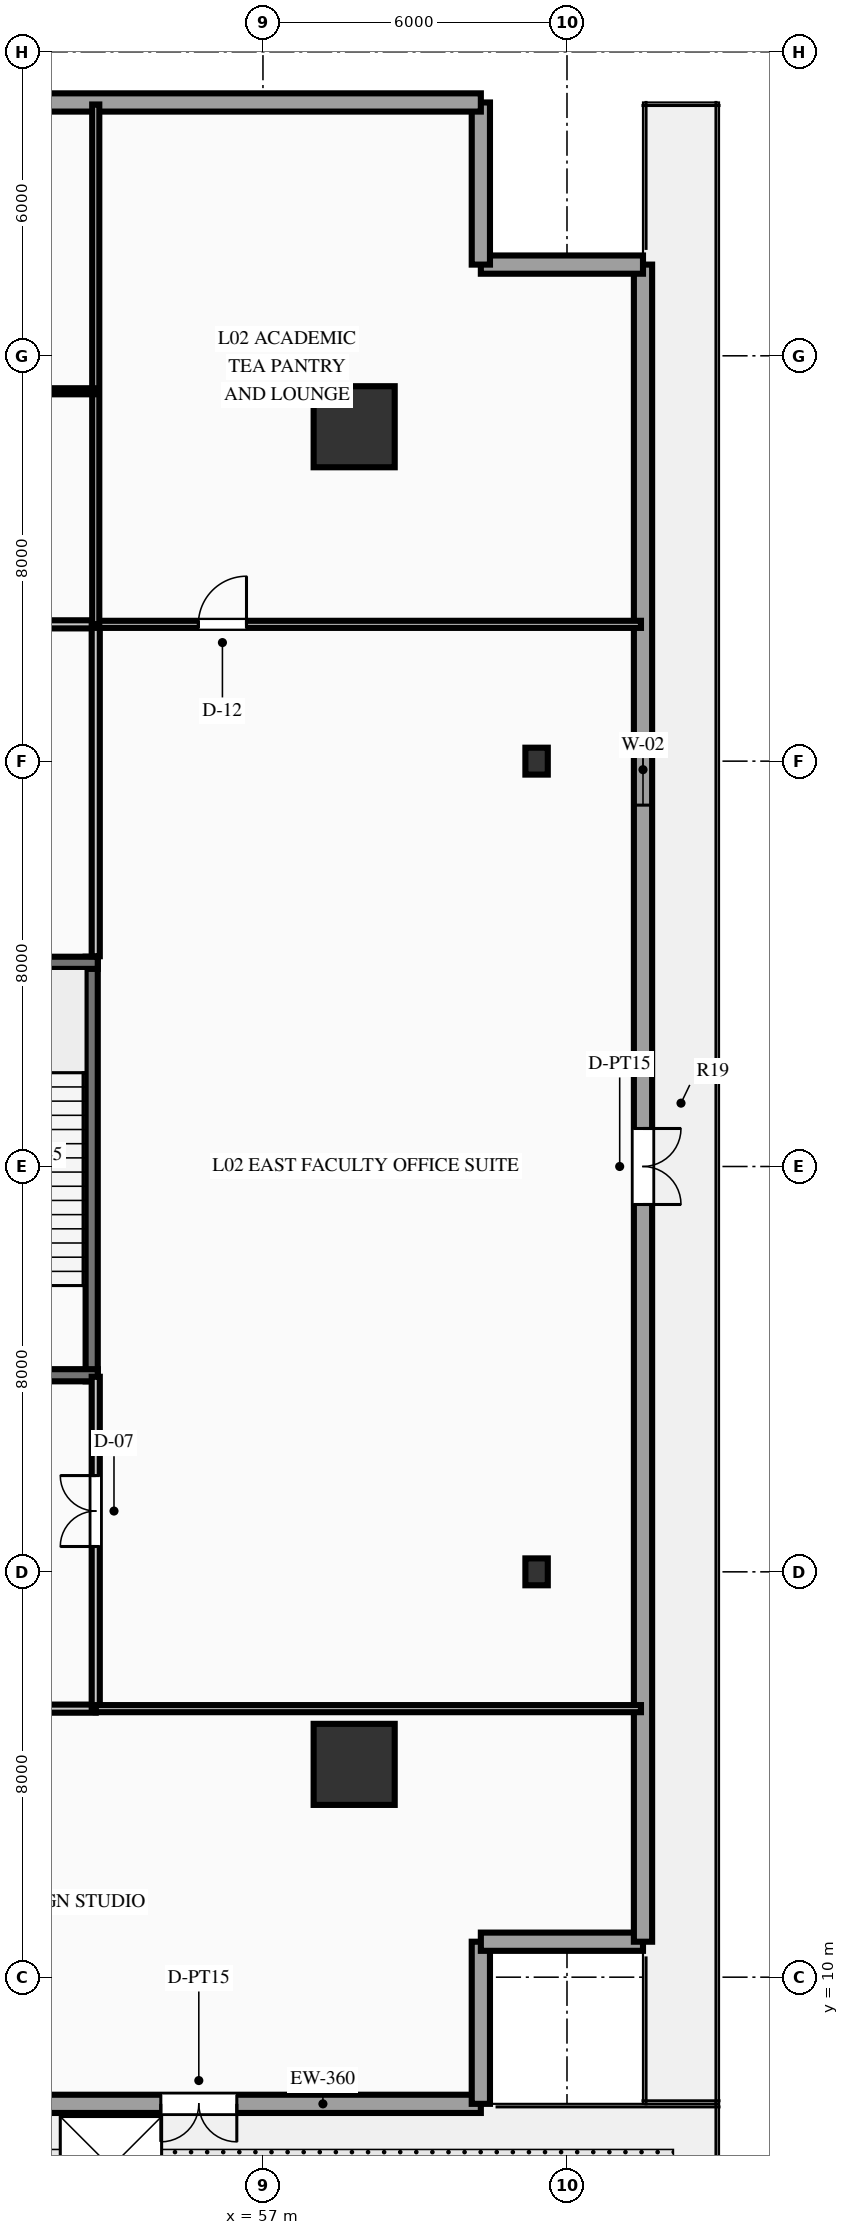
"""IFC4 building model, lengths in metres.
Left out: names, types, materials, properties, quantities, classifications, styles, units other than length and angle.
Written with IfcOpenShell. Run it as: python <this file> out.ifc"""

import sys

from ifc_helpers import new_model, si_unit, direction, frame, frame_2d, origin, origin_2d, place, context, subcontext, project, spatial, rectangle, hollow_rectangle, i_section, extrude, element, fill, save


model = new_model("IFC4")
c1 = context("Model", 3, precision=1e-05, world=origin(), true_north=direction((0.0, 1.0)))
c2 = subcontext(c1, "Body", "Model", "MODEL_VIEW")
j1 = project(units=[si_unit("LENGTHUNIT", "METRE"), si_unit("PLANEANGLEUNIT", "RADIAN")], contexts=[c1])
p1 = place(None, origin())
s1 = spatial("IfcSite", under=j1, at=p1, CompositionType="ELEMENT")
p2 = place(p1, origin())
s2 = spatial("IfcBuilding", under=s1, at=p2, CompositionType="ELEMENT")
p3 = place(p2, frame((0.0, 0.0, 11.4)))
s3 = spatial("IfcBuildingStorey", under=s2, at=p3, CompositionType="ELEMENT", Elevation=11.4)
p4 = place(p3, frame((53.62, 21.76, 0.0), z_axis=(0.0, 0.0, 1.0), x_axis=(0.0, 1.0, 0.0)))
e1 = element("IfcWall", 1, at=p4, inside=s3, PredefinedType="SHEAR", context=c2, shape_type="SweptSolid", body=[
    extrude(rectangle(XDim=8.38, YDim=0.24, at=frame_2d((4.19, 0.0))), origin(), (0.0, 0.0, 1.0), 5.4),
])
p5 = place(p3, frame((49.76, 21.88, 0.0), z_axis=(0.0, 0.0, 1.0), x_axis=(1.0, 0.0, 0.0)))
e2 = element("IfcWall", 2, at=p5, inside=s3, PredefinedType="SHEAR", context=c2, shape_type="SweptSolid", body=[
    extrude(rectangle(XDim=3.98, YDim=0.24, at=frame_2d((1.99, 0.0))), origin(), (0.0, 0.0, 1.0), 5.4),
])
p6 = place(p5, frame((1.465, 0.0, 0.0)))
e3 = element("IfcOpeningElement", 3, at=p6, cuts=e2, PredefinedType="OPENING", context=c2, shape_type="SweptSolid", body=[
    extrude(rectangle(XDim=1.05, YDim=2.15, at=frame_2d((0.525, 1.075))), frame((0.0, 0.13, 0.0), z_axis=(0.0, -1.0, 0.0), x_axis=(1.0, 0.0, 0.0)), (0.0, 0.0, 1.0), 0.26),
])
p7 = place(p3, frame((49.76, 30.02, 0.0), z_axis=(0.0, 0.0, 1.0), x_axis=(1.0, 0.0, 0.0)))
e4 = element("IfcWall", 4, at=p7, inside=s3, PredefinedType="SHEAR", context=c2, shape_type="SweptSolid", body=[
    extrude(rectangle(XDim=3.98, YDim=0.24, at=frame_2d((1.99, 0.0))), origin(), (0.0, 0.0, 1.0), 5.4),
])
for number, where, z_axis, x_axis in (
    (5, (58.8, 14.2, 0.0), (0.0, 0.0, 1.0), (1.0, 0.0, 0.0)),
    (6, (58.8, 40.6, 0.0), (0.0, 0.0, 1.0), (1.0, 0.0, 0.0)),
):
    element("IfcColumn", number, at=place(p3, frame(where, z_axis=z_axis, x_axis=x_axis)), inside=s3, PredefinedType="COLUMN", context=c2, shape_type="SweptSolid", body=[
        extrude(hollow_rectangle(XDim=1.6, YDim=1.6, WallThickness=0.08, at=origin_2d()), origin(), (0.0, 0.0, 1.0), 5.4),
    ])
for number, where, z_axis, x_axis in (
    (7, (62.4, 18.0, 0.0), (0.0, 0.0, 1.0), (1.0, 0.0, 0.0)),
    (8, (62.4, 34.0, 0.0), (0.0, 0.0, 1.0), (1.0, 0.0, 0.0)),
):
    element("IfcColumn", number, at=place(p3, frame(where, z_axis=z_axis, x_axis=x_axis)), inside=s3, PredefinedType="COLUMN", context=c2, shape_type="SweptSolid", body=[
        extrude(i_section(OverallWidth=0.442, OverallDepth=0.531, WebThickness=0.066, FlangeThickness=0.106, at=origin_2d()), origin(), (0.0, 0.0, 1.0), 5.4),
    ])
p8 = place(p3, frame((61.3, 7.5, 0.0), z_axis=(0.0, 0.0, 1.0), x_axis=(-1.0, 0.0, 0.0)))
e9 = element("IfcWall", 9, at=p8, inside=s3, PredefinedType="STANDARD", context=c2, shape_type="SweptSolid", body=[
    extrude(rectangle(XDim=11.132, YDim=0.36, at=frame_2d((5.566, 0.0))), origin(), (0.0, 0.0, 1.0), 5.07),
])
p9 = place(p8, frame((4.816, 0.0, 0.0)))
e10 = element("IfcOpeningElement", 10, at=p9, cuts=e9, PredefinedType="OPENING", context=c2, shape_type="SweptSolid", body=[
    extrude(rectangle(XDim=1.5, YDim=2.25, at=frame_2d((0.75, 1.125))), frame((0.0, 0.19, 0.0), z_axis=(0.0, -1.0, 0.0), x_axis=(1.0, 0.0, 0.0)), (0.0, 0.0, 1.0), 0.38),
])
for number, where, z_axis, x_axis in (
    (11, (61.3, 10.7, 0.0), (0.0, 0.0, 1.0), (0.0, -1.0, 0.0)),
    (12, (64.5, 10.7, 0.0), (0.0, 0.0, 1.0), (-1.0, 0.0, 0.0)),
):
    element("IfcWall", number, at=place(p3, frame(where, z_axis=z_axis, x_axis=x_axis)), inside=s3, PredefinedType="STANDARD", context=c2, shape_type="SweptSolid", body=[
        extrude(rectangle(XDim=3.2, YDim=0.36, at=frame_2d((1.6, 0.0))), origin(), (0.0, 0.0, 1.0), 5.07),
    ])
p10 = place(p3, frame((64.5, 43.8, 0.0), z_axis=(0.0, 0.0, 1.0), x_axis=(0.0, -1.0, 0.0)))
e13 = element("IfcWall", 13, at=p10, inside=s3, PredefinedType="STANDARD", context=c2, shape_type="SweptSolid", body=[
    extrude(rectangle(XDim=33.1, YDim=0.36, at=frame_2d((16.55, 0.0))), origin(), (0.0, 0.0, 1.0), 5.07),
])
p11 = place(p10, frame((17.05, 0.0, 0.0)))
e14 = element("IfcOpeningElement", 14, at=p11, cuts=e13, PredefinedType="OPENING", context=c2, shape_type="SweptSolid", body=[
    extrude(rectangle(XDim=1.5, YDim=2.25, at=frame_2d((0.75, 1.125))), frame((0.0, 0.19, 0.0), z_axis=(0.0, -1.0, 0.0), x_axis=(1.0, 0.0, 0.0)), (0.0, 0.0, 1.0), 0.38),
])
p12 = place(p10, frame((9.268, 0.0, 1.0)))
e15 = element("IfcOpeningElement", 15, at=p12, cuts=e13, PredefinedType="OPENING", context=c2, shape_type="SweptSolid", body=[
    extrude(rectangle(XDim=1.4, YDim=2.2, at=frame_2d((0.7, 1.1))), frame((0.0, 0.19, 0.0), z_axis=(0.0, -1.0, 0.0), x_axis=(1.0, 0.0, 0.0)), (0.0, 0.0, 1.0), 0.38),
])
for number, where, z_axis, x_axis in (
    (16, (61.3, 43.8, 0.0), (0.0, 0.0, 1.0), (1.0, 0.0, 0.0)),
    (17, (61.3, 47.0, 0.0), (0.0, 0.0, 1.0), (0.0, -1.0, 0.0)),
):
    element("IfcWall", number, at=place(p3, frame(where, z_axis=z_axis, x_axis=x_axis)), inside=s3, PredefinedType="STANDARD", context=c2, shape_type="SweptSolid", body=[
        extrude(rectangle(XDim=3.2, YDim=0.36, at=frame_2d((1.6, 0.0))), origin(), (0.0, 0.0, 1.0), 5.07),
    ])
p13 = place(p3, frame((50.168, 47.0, 0.0), z_axis=(0.0, 0.0, 1.0), x_axis=(1.0, 0.0, 0.0)))
e18 = element("IfcWall", 18, at=p13, inside=s3, PredefinedType="STANDARD", context=c2, shape_type="SweptSolid", body=[
    extrude(rectangle(XDim=11.132, YDim=0.36, at=frame_2d((5.566, 0.0))), origin(), (0.0, 0.0, 1.0), 5.07),
])
p14 = place(p3, frame((18.3, 15.3, 0.0), z_axis=(0.0, 0.0, 1.0), x_axis=(1.0, 0.0, 0.0)))
e19 = element("IfcWall", 19, at=p14, inside=s3, PredefinedType="PARTITIONING", context=c2, shape_type="SweptSolid", body=[
    extrude(rectangle(XDim=35.4, YDim=0.16, at=frame_2d((17.7, 0.0))), origin(), (0.0, 0.0, 1.0), 4.292),
])
p15 = place(p14, frame((5.825, 0.0, 0.0)))
e20 = element("IfcOpeningElement", 20, at=p15, cuts=e19, PredefinedType="OPENING", context=c2, shape_type="SweptSolid", body=[
    extrude(rectangle(XDim=1.05, YDim=2.15, at=frame_2d((0.525, 1.075))), frame((0.0, 0.09, 0.0), z_axis=(0.0, -1.0, 0.0), x_axis=(1.0, 0.0, 0.0)), (0.0, 0.0, 1.0), 0.18),
])
p16 = place(p14, frame((16.55, 0.0, 0.0)))
e21 = element("IfcOpeningElement", 21, at=p16, cuts=e19, PredefinedType="OPENING", context=c2, shape_type="SweptSolid", body=[
    extrude(rectangle(XDim=1.4, YDim=2.2, at=frame_2d((0.7, 1.1))), frame((0.0, 0.09, 0.0), z_axis=(0.0, -1.0, 0.0), x_axis=(1.0, 0.0, 0.0)), (0.0, 0.0, 1.0), 0.18),
])
p17 = place(p14, frame((28.075, 0.0, 0.0)))
e22 = element("IfcOpeningElement", 22, at=p17, cuts=e19, PredefinedType="OPENING", context=c2, shape_type="SweptSolid", body=[
    extrude(rectangle(XDim=1.05, YDim=2.15, at=frame_2d((0.525, 1.075))), frame((0.0, 0.09, 0.0), z_axis=(0.0, -1.0, 0.0), x_axis=(1.0, 0.0, 0.0)), (0.0, 0.0, 1.0), 0.18),
])
p18 = place(p3, frame((18.3, 36.7, 0.0), z_axis=(0.0, 0.0, 1.0), x_axis=(1.0, 0.0, 0.0)))
e23 = element("IfcWall", 23, at=p18, inside=s3, PredefinedType="PARTITIONING", context=c2, shape_type="SweptSolid", body=[
    extrude(rectangle(XDim=35.4, YDim=0.16, at=frame_2d((17.7, 0.0))), origin(), (0.0, 0.0, 1.0), 5.07),
])
p19 = place(p18, frame((4.725, 0.0, 0.0)))
e24 = element("IfcOpeningElement", 24, at=p19, cuts=e23, PredefinedType="OPENING", context=c2, shape_type="SweptSolid", body=[
    extrude(rectangle(XDim=1.05, YDim=2.15, at=frame_2d((0.525, 1.075))), frame((0.0, 0.09, 0.0), z_axis=(0.0, -1.0, 0.0), x_axis=(1.0, 0.0, 0.0)), (0.0, 0.0, 1.0), 0.18),
])
p20 = place(p18, frame((16.975, 0.0, 0.0)))
e25 = element("IfcOpeningElement", 25, at=p20, cuts=e23, PredefinedType="OPENING", context=c2, shape_type="SweptSolid", body=[
    extrude(rectangle(XDim=1.05, YDim=2.15, at=frame_2d((0.525, 1.075))), frame((0.0, 0.09, 0.0), z_axis=(0.0, -1.0, 0.0), x_axis=(1.0, 0.0, 0.0)), (0.0, 0.0, 1.0), 0.18),
])
p21 = place(p18, frame((27.225, 0.0, 0.0)))
e26 = element("IfcOpeningElement", 26, at=p21, cuts=e23, PredefinedType="OPENING", context=c2, shape_type="SweptSolid", body=[
    extrude(rectangle(XDim=0.95, YDim=2.15, at=frame_2d((0.475, 1.075))), frame((0.0, 0.09, 0.0), z_axis=(0.0, -1.0, 0.0), x_axis=(1.0, 0.0, 0.0)), (0.0, 0.0, 1.0), 0.18),
])
p22 = place(p18, frame((30.275, 0.0, 0.0)))
e27 = element("IfcOpeningElement", 27, at=p22, cuts=e23, PredefinedType="OPENING", context=c2, shape_type="SweptSolid", body=[
    extrude(rectangle(XDim=0.95, YDim=2.15, at=frame_2d((0.475, 1.075))), frame((0.0, 0.09, 0.0), z_axis=(0.0, -1.0, 0.0), x_axis=(1.0, 0.0, 0.0)), (0.0, 0.0, 1.0), 0.18),
])
p23 = place(p18, frame((33.3, 0.0, 0.0)))
e28 = element("IfcOpeningElement", 28, at=p23, cuts=e23, PredefinedType="OPENING", context=c2, shape_type="SweptSolid", body=[
    extrude(rectangle(XDim=1.0, YDim=2.15, at=frame_2d((0.5, 1.075))), frame((0.0, 0.09, 0.0), z_axis=(0.0, -1.0, 0.0), x_axis=(1.0, 0.0, 0.0)), (0.0, 0.0, 1.0), 0.18),
])
p24 = place(p3, frame((53.7, 15.3, 0.0), z_axis=(0.0, 0.0, 1.0), x_axis=(0.0, 1.0, 0.0)))
e29 = element("IfcWall", 29, at=p24, inside=s3, PredefinedType="PARTITIONING", context=c2, shape_type="SweptSolid", body=[
    extrude(rectangle(XDim=6.55, YDim=0.16, at=frame_2d((3.275, 0.0))), origin(), (0.0, 0.0, 1.0), 5.07),
])
p25 = place(p24, frame((3.2, 0.0, 0.0)))
e30 = element("IfcOpeningElement", 30, at=p25, cuts=e29, PredefinedType="OPENING", context=c2, shape_type="SweptSolid", body=[
    extrude(rectangle(XDim=1.4, YDim=2.2, at=frame_2d((0.7, 1.1))), frame((0.0, 0.09, 0.0), z_axis=(0.0, -1.0, 0.0), x_axis=(1.0, 0.0, 0.0)), (0.0, 0.0, 1.0), 0.18),
])
p26 = place(p3, frame((53.7, 30.15, 0.0), z_axis=(0.0, 0.0, 1.0), x_axis=(0.0, 1.0, 0.0)))
e31 = element("IfcWall", 31, at=p26, inside=s3, PredefinedType="PARTITIONING", context=c2, shape_type="SweptSolid", body=[
    extrude(rectangle(XDim=6.55, YDim=0.16, at=frame_2d((3.275, 0.0))), origin(), (0.0, 0.0, 1.0), 5.07),
])
p27 = place(p3, frame((53.7, 15.3, 0.0), z_axis=(0.0, 0.0, 1.0), x_axis=(1.0, 0.0, 0.0)))
e32 = element("IfcWall", 32, at=p27, inside=s3, PredefinedType="PARTITIONING", context=c2, shape_type="SweptSolid", body=[
    extrude(rectangle(XDim=10.76, YDim=0.14, at=frame_2d((5.38, 0.0))), origin(), (0.0, 0.0, 1.0), 4.292),
])
p28 = place(p3, frame((53.7, 36.7, 0.0), z_axis=(0.0, 0.0, 1.0), x_axis=(1.0, 0.0, 0.0)))
e33 = element("IfcWall", 33, at=p28, inside=s3, PredefinedType="PARTITIONING", context=c2, shape_type="SweptSolid", body=[
    extrude(rectangle(XDim=10.76, YDim=0.14, at=frame_2d((5.38, 0.0))), origin(), (0.0, 0.0, 1.0), 5.07),
])
p29 = place(p28, frame((2.025, 0.0, 0.0)))
e34 = element("IfcOpeningElement", 34, at=p29, cuts=e33, PredefinedType="OPENING", context=c2, shape_type="SweptSolid", body=[
    extrude(rectangle(XDim=0.95, YDim=2.15, at=frame_2d((0.475, 1.075))), frame((0.0, 0.08, 0.0), z_axis=(0.0, -1.0, 0.0), x_axis=(1.0, 0.0, 0.0)), (0.0, 0.0, 1.0), 0.16),
])
p30 = place(p3, frame((53.7, 36.7, 0.0), z_axis=(0.0, 0.0, 1.0), x_axis=(0.0, 1.0, 0.0)))
e35 = element("IfcWall", 35, at=p30, inside=s3, PredefinedType="PARTITIONING", context=c2, shape_type="SweptSolid", body=[
    extrude(rectangle(XDim=10.26, YDim=0.14, at=frame_2d((5.13, 0.0))), origin(), (0.0, 0.0, 1.0), 5.07),
])
p31 = place(p3, frame((44.5, 41.3, 0.0), z_axis=(0.0, 0.0, 1.0), x_axis=(1.0, 0.0, 0.0)))
e36 = element("IfcWall", 36, at=p31, inside=s3, PredefinedType="PARTITIONING", context=c2, shape_type="SweptSolid", body=[
    extrude(rectangle(XDim=9.2, YDim=0.12, at=frame_2d((4.6, 0.0))), origin(), (0.0, 0.0, 1.0), 4.292),
])
p32 = place(p9, origin())
e37 = element("IfcDoor", 37, at=p32, inside=s3, OperationType="DOUBLE_DOOR_SINGLE_SWING", PredefinedType="DOOR", context=c2, shape_type="SweptSolid", body=[
    extrude(rectangle(XDim=1.5, YDim=2.25, at=frame_2d((0.75, 1.125))), frame((0.0, 0.025, 0.0), z_axis=(0.0, -1.0, 0.0), x_axis=(1.0, 0.0, 0.0)), (0.0, 0.0, 1.0), 0.05),
])
fill(e10, e37)
p33 = place(p11, origin())
e38 = element("IfcDoor", 38, at=p33, inside=s3, OperationType="DOUBLE_DOOR_SINGLE_SWING", PredefinedType="DOOR", context=c2, shape_type="SweptSolid", body=[
    extrude(rectangle(XDim=1.5, YDim=2.25, at=frame_2d((0.75, 1.125))), frame((0.0, 0.025, 0.0), z_axis=(0.0, -1.0, 0.0), x_axis=(1.0, 0.0, 0.0)), (0.0, 0.0, 1.0), 0.05),
])
fill(e14, e38)
p34 = place(p12, origin())
e39 = element("IfcWindow", 39, at=p34, inside=s3, PartitioningType="SINGLE_PANEL", PredefinedType="WINDOW", context=c2, shape_type="SweptSolid", body=[
    extrude(rectangle(XDim=1.4, YDim=2.2, at=frame_2d((0.7, 1.1))), frame((0.0, 0.03, 0.0), z_axis=(0.0, -1.0, 0.0), x_axis=(1.0, 0.0, 0.0)), (0.0, 0.0, 1.0), 0.06),
])
fill(e15, e39)
p35 = place(p3, frame((0.0, 0.0, -0.25)))
p36 = place(p35, frame((54.0, 6.25, 0.2)))
e40 = element("IfcWindow", 40, at=p36, inside=s3, PartitioningType="SINGLE_PANEL", PredefinedType="SKYLIGHT", context=c2, shape_type="SweptSolid", body=[
    extrude(rectangle(XDim=2.0, YDim=2.0, at=origin_2d()), origin(), (0.0, 0.0, 1.0), 0.05),
])
p37 = place(p25, origin())
e41 = element("IfcDoor", 41, at=p37, inside=s3, OperationType="DOUBLE_DOOR_SINGLE_SWING", PredefinedType="DOOR", context=c2, shape_type="SweptSolid", body=[
    extrude(rectangle(XDim=1.4, YDim=2.2, at=frame_2d((0.7, 1.1))), frame((0.0, 0.025, 0.0), z_axis=(0.0, -1.0, 0.0), x_axis=(1.0, 0.0, 0.0)), (0.0, 0.0, 1.0), 0.05),
])
fill(e30, e41)
p38 = place(p29, origin())
e42 = element("IfcDoor", 42, at=p38, inside=s3, OperationType="SINGLE_SWING_RIGHT", PredefinedType="DOOR", context=c2, shape_type="SweptSolid", body=[
    extrude(rectangle(XDim=0.95, YDim=2.15, at=frame_2d((0.475, 1.075))), frame((0.0, 0.025, 0.0), z_axis=(0.0, -1.0, 0.0), x_axis=(1.0, 0.0, 0.0)), (0.0, 0.0, 1.0), 0.05),
])
fill(e34, e42)
save(model, sys.argv[1])
